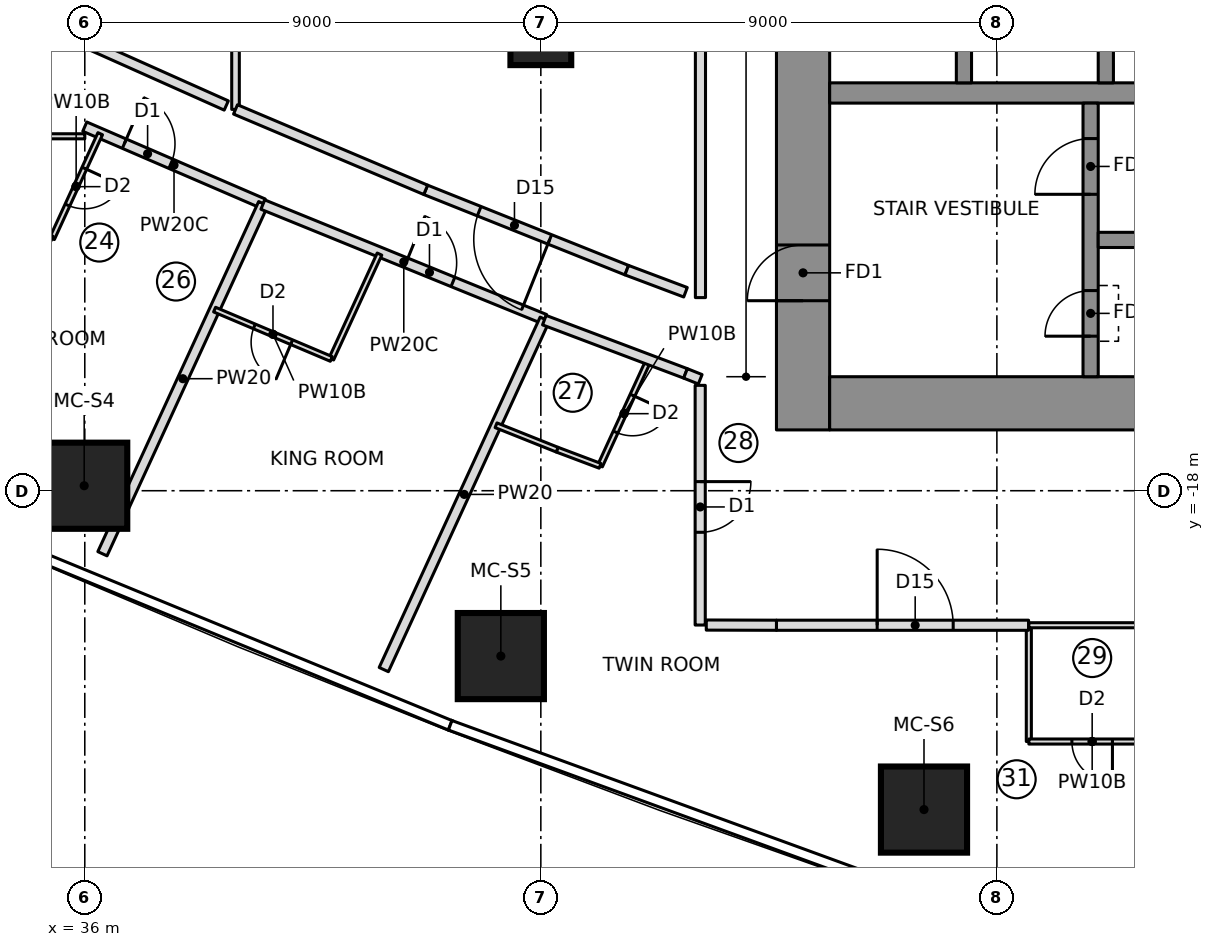
"""IFC4 building model, lengths in metres.
Left out: names, types, materials, properties, quantities, classifications, styles, units other than length and angle.
Written with IfcOpenShell. Run it as: python <this file> out.ifc"""

import sys

from ifc_helpers import new_model, si_unit, direction, frame, frame_2d, origin, origin_2d, place, context, subcontext, project, spatial, rectangle, extrude, element, fill, save


model = new_model("IFC4")
c1 = context("Model", 3, precision=1e-05, world=origin(), true_north=direction((0.0, 1.0)))
c2 = subcontext(c1, "Body", "Model", "MODEL_VIEW")
j1 = project(units=[si_unit("LENGTHUNIT", "METRE"), si_unit("PLANEANGLEUNIT", "RADIAN")], contexts=[c1])
p1 = place(None, origin())
s1 = spatial("IfcSite", under=j1, at=p1, CompositionType="ELEMENT")
p2 = place(p1, origin())
s2 = spatial("IfcBuilding", under=s1, at=p2, CompositionType="ELEMENT")
p3 = place(p2, frame((0.0, 0.0, 109.75)))
s3 = spatial("IfcBuildingStorey", under=s2, at=p3, CompositionType="ELEMENT", Elevation=109.75)
p4 = place(p3, frame((50.175, -16.8, 0.0), z_axis=(0.0, 0.0, 1.0), x_axis=(0.0, 1.0, 0.0)))
e1 = element("IfcWall", 1, at=p4, inside=s3, PredefinedType="SHEAR", context=c2, shape_type="SweptSolid", body=[
    extrude(rectangle(XDim=10.15, YDim=1.05, at=frame_2d((5.075, 0.0))), origin(), (0.0, 0.0, 1.0), 3.55),
])
p5 = place(p4, frame((2.55, 0.0, 0.0)))
e2 = element("IfcOpeningElement", 2, at=p5, cuts=e1, PredefinedType="OPENING", context=c2, shape_type="SweptSolid", body=[
    extrude(rectangle(XDim=1.1, YDim=2.1, at=frame_2d((0.55, 1.05))), frame((0.0, 0.535, 0.0), z_axis=(0.0, -1.0, 0.0), x_axis=(1.0, 0.0, 0.0)), (0.0, 0.0, 1.0), 1.07),
])
p6 = place(p3, frame((50.7, -16.275, 0.0), z_axis=(0.0, 0.0, 1.0), x_axis=(1.0, 0.0, 0.0)))
e3 = element("IfcWall", 3, at=p6, inside=s3, PredefinedType="SHEAR", context=c2, shape_type="SweptSolid", body=[
    extrude(rectangle(XDim=14.07, YDim=1.05, at=frame_2d((7.035, 0.0))), origin(), (0.0, 0.0, 1.0), 3.55),
])
p7 = place(p3, frame((50.7, -10.15, 0.0), z_axis=(0.0, 0.0, 1.0), x_axis=(1.0, 0.0, 0.0)))
e4 = element("IfcWall", 4, at=p7, inside=s3, PredefinedType="SHEAR", context=c2, shape_type="SweptSolid", body=[
    extrude(rectangle(XDim=13.02, YDim=0.4, at=frame_2d((6.51, 0.0))), origin(), (0.0, 0.0, 1.0), 3.55),
])
for number, where, z_axis, x_axis in (
    (5, (53.35, -9.95, 0.0), (0.0, 0.0, 1.0), (0.0, 1.0, 0.0)),
    (6, (56.15, -9.95, 0.0), (0.0, 0.0, 1.0), (0.0, 1.0, 0.0)),
):
    element("IfcWall", number, at=place(p3, frame(where, z_axis=z_axis, x_axis=x_axis)), inside=s3, PredefinedType="SHEAR", context=c2, shape_type="SweptSolid", body=[
        extrude(rectangle(XDim=3.0, YDim=0.3, at=frame_2d((1.5, 0.0))), origin(), (0.0, 0.0, 1.0), 3.55),
    ])
p8 = place(p3, frame((55.85, -15.75, 0.0), z_axis=(0.0, 0.0, 1.0), x_axis=(0.0, 1.0, 0.0)))
e7 = element("IfcWall", 7, at=p8, inside=s3, PredefinedType="SHEAR", context=c2, shape_type="SweptSolid", body=[
    extrude(rectangle(XDim=5.4, YDim=0.3, at=frame_2d((2.7, 0.0))), origin(), (0.0, 0.0, 1.0), 3.55),
])
p9 = place(p8, frame((3.6, 0.0, 0.0)))
e8 = element("IfcOpeningElement", 8, at=p9, cuts=e7, PredefinedType="OPENING", context=c2, shape_type="SweptSolid", body=[
    extrude(rectangle(XDim=1.1, YDim=2.1, at=frame_2d((0.55, 1.05))), frame((0.0, 0.16, 0.0), z_axis=(0.0, -1.0, 0.0), x_axis=(1.0, 0.0, 0.0)), (0.0, 0.0, 1.0), 0.32),
])
p10 = place(p8, frame((0.8, 0.0, 0.0)))
e9 = element("IfcOpeningElement", 9, at=p10, cuts=e7, PredefinedType="OPENING", context=c2, shape_type="SweptSolid", body=[
    extrude(rectangle(XDim=0.9, YDim=2.1, at=frame_2d((0.45, 1.05))), frame((0.0, 0.16, 0.0), z_axis=(0.0, -1.0, 0.0), x_axis=(1.0, 0.0, 0.0)), (0.0, 0.0, 1.0), 0.32),
])
p11 = place(p3, frame((56.0, -13.05, 0.0), z_axis=(0.0, 0.0, 1.0), x_axis=(1.0, 0.0, 0.0)))
e10 = element("IfcWall", 10, at=p11, inside=s3, PredefinedType="SHEAR", context=c2, shape_type="SweptSolid", body=[
    extrude(rectangle(XDim=7.72, YDim=0.3, at=frame_2d((3.86, 0.0))), origin(), (0.0, 0.0, 1.0), 3.55),
])
for number, where, z_axis, x_axis in (
    (11, (35.988, -17.902, 0.0), (0.0, 0.0, 1.0), (1.0, 0.0, 0.0)),
    (12, (44.211, -21.264, 0.0), (0.0, 0.0, 1.0), (1.0, 0.0, 0.0)),
    (13, (52.562, -24.293, 0.0), (0.0, 0.0, 1.0), (1.0, 0.0, 0.0)),
):
    element("IfcColumn", number, at=place(p3, frame(where, z_axis=z_axis, x_axis=x_axis)), inside=s3, PredefinedType="COLUMN", context=c2, shape_type="SweptSolid", body=[
        extrude(rectangle(XDim=1.7, YDim=1.7, at=origin_2d()), origin(), (0.0, 0.0, 1.0), 3.55),
    ])
p12 = place(p3, frame((45.0, -9.0, 0.0), z_axis=(0.0, 0.0, 1.0), x_axis=(1.0, 0.0, 0.0)))
e14 = element("IfcColumn", 14, at=p12, inside=s3, PredefinedType="COLUMN", context=c2, shape_type="SweptSolid", body=[
    extrude(rectangle(XDim=1.2, YDim=1.2, at=origin_2d()), origin(), (0.0, 0.0, 1.0), 3.55),
])
p13 = place(p3, frame((54.631, -22.95, 0.0), z_axis=(0.0, 0.0, 1.0), x_axis=(0.0, 1.0, 0.0)))
e15 = element("IfcWall", 15, at=p13, inside=s3, PredefinedType="PARTITIONING", context=c2, shape_type="SweptSolid", body=[
    extrude(rectangle(XDim=2.3, YDim=0.1, at=frame_2d((1.15, 0.0))), origin(), (0.0, 0.0, 1.0), 3.25),
])
p14 = place(p3, frame((57.131, -22.95, 0.0), z_axis=(0.0, 0.0, 1.0), x_axis=(-1.0, 0.0, 0.0)))
e16 = element("IfcWall", 16, at=p14, inside=s3, PredefinedType="PARTITIONING", context=c2, shape_type="SweptSolid", body=[
    extrude(rectangle(XDim=2.5, YDim=0.1, at=frame_2d((1.25, 0.0))), origin(), (0.0, 0.0, 1.0), 3.25),
])
p15 = place(p14, frame((0.85, 0.0, 0.0)))
e17 = element("IfcOpeningElement", 17, at=p15, cuts=e16, PredefinedType="OPENING", context=c2, shape_type="SweptSolid", body=[
    extrude(rectangle(XDim=0.8, YDim=2.1, at=frame_2d((0.4, 1.05))), frame((0.0, 0.06, 0.0), z_axis=(0.0, -1.0, 0.0), x_axis=(1.0, 0.0, 0.0)), (0.0, 0.0, 1.0), 0.12),
])
p16 = place(p3, frame((36.0, -10.815, 0.0), z_axis=(0.0, 0.0, 1.0), x_axis=(0.918174446699, -0.396176331233, 0.0)))
e18 = element("IfcWall", 18, at=p16, inside=s3, PredefinedType="PARTITIONING", context=c2, shape_type="SweptSolid", body=[
    extrude(rectangle(XDim=3.836, YDim=0.2, at=frame_2d((1.918, 0.0))), origin(), (0.0, 0.0, 1.0), 3.25),
])
p17 = place(p16, frame((0.85, 0.0, 0.0)))
e19 = element("IfcOpeningElement", 19, at=p17, cuts=e18, PredefinedType="OPENING", context=c2, shape_type="SweptSolid", body=[
    extrude(rectangle(XDim=1.0, YDim=2.1, at=frame_2d((0.5, 1.05))), frame((0.0, 0.11, 0.0), z_axis=(0.0, -1.0, 0.0), x_axis=(1.0, 0.0, 0.0)), (0.0, 0.0, 1.0), 0.22),
])
p18 = place(p3, frame((36.305, -10.954, 0.0), z_axis=(0.0, 0.0, 1.0), x_axis=(-0.41750734959, -0.908673545911, 0.0)))
e20 = element("IfcWall", 20, at=p18, inside=s3, PredefinedType="PARTITIONING", context=c2, shape_type="SweptSolid", body=[
    extrude(rectangle(XDim=2.277, YDim=0.1, at=frame_2d((1.139, 0.0))), origin(), (0.0, 0.0, 1.0), 3.25),
])
p19 = place(p18, frame((0.75, 0.0, 0.0)))
e21 = element("IfcOpeningElement", 21, at=p19, cuts=e20, PredefinedType="OPENING", context=c2, shape_type="SweptSolid", body=[
    extrude(rectangle(XDim=0.8, YDim=2.1, at=frame_2d((0.4, 1.05))), frame((0.0, 0.06, 0.0), z_axis=(0.0, -1.0, 0.0), x_axis=(1.0, 0.0, 0.0)), (0.0, 0.0, 1.0), 0.12),
])
p20 = place(p3, frame((35.354, -13.023, 0.0), z_axis=(0.0, 0.0, 1.0), x_axis=(-0.913060453705, 0.407824236504, 0.0)))
e22 = element("IfcWall", 22, at=p20, inside=s3, PredefinedType="PARTITIONING", context=c2, shape_type="SweptSolid", body=[
    extrude(rectangle(XDim=2.243, YDim=0.1, at=frame_2d((1.122, 0.0))), origin(), (0.0, 0.0, 1.0), 3.25),
])
p21 = place(p3, frame((36.348, -19.244, 0.0), z_axis=(0.0, 0.0, 1.0), x_axis=(0.417442847913, 0.908703179661, 0.0)))
e23 = element("IfcWall", 23, at=p21, inside=s3, PredefinedType="PARTITIONING", context=c2, shape_type="SweptSolid", body=[
    extrude(rectangle(XDim=7.604, YDim=0.2, at=frame_2d((3.802, 0.0))), origin(), (0.0, 0.0, 1.0), 3.25),
])
p22 = place(p3, frame((39.514, -12.353, 0.0), z_axis=(0.0, 0.0, 1.0), x_axis=(0.926327862679, -0.376718317613, 0.0)))
e24 = element("IfcWall", 24, at=p22, inside=s3, PredefinedType="PARTITIONING", context=c2, shape_type="SweptSolid", body=[
    extrude(rectangle(XDim=6.006, YDim=0.2, at=frame_2d((3.003, 0.0))), origin(), (0.0, 0.0, 1.0), 3.25),
])
p23 = place(p22, frame((3.05, 0.0, 0.0)))
e25 = element("IfcOpeningElement", 25, at=p23, cuts=e24, PredefinedType="OPENING", context=c2, shape_type="SweptSolid", body=[
    extrude(rectangle(XDim=1.0, YDim=2.1, at=frame_2d((0.5, 1.05))), frame((0.0, 0.11, 0.0), z_axis=(0.0, -1.0, 0.0), x_axis=(1.0, 0.0, 0.0)), (0.0, 0.0, 1.0), 0.22),
])
p24 = place(p3, frame((41.816, -13.33, 0.0), z_axis=(0.0, 0.0, 1.0), x_axis=(-0.417433204355, -0.908707609686, 0.0)))
e26 = element("IfcWall", 26, at=p24, inside=s3, PredefinedType="PARTITIONING", context=c2, shape_type="SweptSolid", body=[
    extrude(rectangle(XDim=2.278, YDim=0.1, at=frame_2d((1.139, 0.0))), origin(), (0.0, 0.0, 1.0), 3.25),
])
p25 = place(p3, frame((40.865, -15.4, 0.0), z_axis=(0.0, 0.0, 1.0), x_axis=(-0.921042675983, 0.38946166566, 0.0)))
e27 = element("IfcWall", 27, at=p25, inside=s3, PredefinedType="PARTITIONING", context=c2, shape_type="SweptSolid", body=[
    extrude(rectangle(XDim=2.501, YDim=0.1, at=frame_2d((1.25, 0.0))), origin(), (0.0, 0.0, 1.0), 3.25),
])
p26 = place(p25, frame((0.85, 0.0, 0.0)))
e28 = element("IfcOpeningElement", 28, at=p26, cuts=e27, PredefinedType="OPENING", context=c2, shape_type="SweptSolid", body=[
    extrude(rectangle(XDim=0.8, YDim=2.1, at=frame_2d((0.4, 1.05))), frame((0.0, 0.06, 0.0), z_axis=(0.0, -1.0, 0.0), x_axis=(1.0, 0.0, 0.0)), (0.0, 0.0, 1.0), 0.12),
])
p27 = place(p3, frame((41.901, -21.53, 0.0), z_axis=(0.0, 0.0, 1.0), x_axis=(0.417427858403, 0.908710065438, 0.0)))
e29 = element("IfcWall", 29, at=p27, inside=s3, PredefinedType="PARTITIONING", context=c2, shape_type="SweptSolid", body=[
    extrude(rectangle(XDim=7.61, YDim=0.2, at=frame_2d((3.805, 0.0))), origin(), (0.0, 0.0, 1.0), 3.25),
])
p28 = place(p3, frame((47.122, -15.434, 0.0), z_axis=(0.0, 0.0, 1.0), x_axis=(-0.417409478396, -0.90871850831, 0.0)))
e30 = element("IfcWall", 30, at=p28, inside=s3, PredefinedType="PARTITIONING", context=c2, shape_type="SweptSolid", body=[
    extrude(rectangle(XDim=2.283, YDim=0.1, at=frame_2d((1.142, 0.0))), origin(), (0.0, 0.0, 1.0), 3.25),
])
p29 = place(p28, frame((0.75, 0.0, 0.0)))
e31 = element("IfcOpeningElement", 31, at=p29, cuts=e30, PredefinedType="OPENING", context=c2, shape_type="SweptSolid", body=[
    extrude(rectangle(XDim=0.8, YDim=2.1, at=frame_2d((0.4, 1.05))), frame((0.0, 0.06, 0.0), z_axis=(0.0, -1.0, 0.0), x_axis=(1.0, 0.0, 0.0)), (0.0, 0.0, 1.0), 0.12),
])
p30 = place(p3, frame((46.169, -17.509, 0.0), z_axis=(0.0, 0.0, 1.0), x_axis=(-0.935885332459, 0.352304760808, 0.0)))
e32 = element("IfcWall", 32, at=p30, inside=s3, PredefinedType="PARTITIONING", context=c2, shape_type="SweptSolid", body=[
    extrude(rectangle(XDim=0.906, YDim=0.1, at=frame_2d((0.453, 0.0))), origin(), (0.0, 0.0, 1.0), 3.25),
])
p31 = place(p3, frame((45.321, -17.19, 0.0), z_axis=(0.0, 0.0, 1.0), x_axis=(-0.928593389657, 0.371098796393, 0.0)))
e33 = element("IfcWall", 33, at=p31, inside=s3, PredefinedType="PARTITIONING", context=c2, shape_type="SweptSolid", body=[
    extrude(rectangle(XDim=1.298, YDim=0.1, at=frame_2d((0.649, 0.0))), origin(), (0.0, 0.0, 1.0), 3.25),
])
p32 = place(p3, frame((38.792, -10.397, 0.0), z_axis=(0.0, 0.0, 1.0), x_axis=(-0.913029587861, 0.407893333716, 0.0)))
e34 = element("IfcWall", 34, at=p32, inside=s3, PredefinedType="PARTITIONING", context=c2, shape_type="SweptSolid", body=[
    extrude(rectangle(XDim=3.058, YDim=0.2, at=frame_2d((1.529, 0.0))), origin(), (0.0, 0.0, 1.0), 3.25),
])
p33 = place(p3, frame((38.975, -10.474, 0.0), z_axis=(0.0, 0.0, 1.0), x_axis=(0.0, 1.0, 0.0)))
e35 = element("IfcWall", 35, at=p33, inside=s3, PredefinedType="PARTITIONING", context=c2, shape_type="SweptSolid", body=[
    extrude(rectangle(XDim=20.949, YDim=0.15, at=frame_2d((10.474, 0.0))), origin(), (0.0, 0.0, 1.0), 3.25),
])
p34 = place(p3, frame((46.696, -13.647, 0.0), z_axis=(0.0, 0.0, 1.0), x_axis=(-0.928638161177, 0.370986745864, 0.0)))
e36 = element("IfcWall", 36, at=p34, inside=s3, PredefinedType="PARTITIONING", context=c2, shape_type="SweptSolid", body=[
    extrude(rectangle(XDim=4.273, YDim=0.2, at=frame_2d((2.136, 0.0))), origin(), (0.0, 0.0, 1.0), 3.25),
])
p35 = place(p34, frame((1.636, 0.0, 0.0)))
e37 = element("IfcOpeningElement", 37, at=p35, cuts=e36, PredefinedType="OPENING", context=c2, shape_type="SweptSolid", body=[
    extrude(rectangle(XDim=1.5, YDim=2.1, at=frame_2d((0.75, 1.05))), frame((0.0, 0.11, 0.0), z_axis=(0.0, -1.0, 0.0), x_axis=(1.0, 0.0, 0.0)), (0.0, 0.0, 1.0), 0.22),
])
p36 = place(p3, frame((42.728, -12.062, 0.0), z_axis=(0.0, 0.0, 1.0), x_axis=(-0.921030909625, 0.389489490891, 0.0)))
e38 = element("IfcWall", 38, at=p36, inside=s3, PredefinedType="PARTITIONING", context=c2, shape_type="SweptSolid", body=[
    extrude(rectangle(XDim=4.075, YDim=0.2, at=frame_2d((2.038, 0.0))), origin(), (0.0, 0.0, 1.0), 3.25),
])
p37 = place(p3, frame((49.65, -20.655, 0.0), z_axis=(0.0, 0.0, 1.0), x_axis=(1.0, 0.0, 0.0)))
e39 = element("IfcWall", 39, at=p37, inside=s3, PredefinedType="PARTITIONING", context=c2, shape_type="SweptSolid", body=[
    extrude(rectangle(XDim=4.976, YDim=0.2, at=frame_2d((2.488, 0.0))), origin(), (0.0, 0.0, 1.0), 3.25),
])
p38 = place(p37, frame((1.988, 0.0, 0.0)))
e40 = element("IfcOpeningElement", 40, at=p38, cuts=e39, PredefinedType="OPENING", context=c2, shape_type="SweptSolid", body=[
    extrude(rectangle(XDim=1.5, YDim=2.1, at=frame_2d((0.75, 1.05))), frame((0.0, 0.11, 0.0), z_axis=(0.0, -1.0, 0.0), x_axis=(1.0, 0.0, 0.0)), (0.0, 0.0, 1.0), 0.22),
])
p39 = place(p3, frame((54.631, -20.655, 0.0), z_axis=(0.0, 0.0, 1.0), x_axis=(1.0, 0.0, 0.0)))
e41 = element("IfcWall", 41, at=p39, inside=s3, PredefinedType="PARTITIONING", context=c2, shape_type="SweptSolid", body=[
    extrude(rectangle(XDim=2.5, YDim=0.1, at=frame_2d((1.25, 0.0))), origin(), (0.0, 0.0, 1.0), 3.25),
])
p40 = place(p3, frame((33.53, -11.005, 0.0), z_axis=(0.0, 0.0, 1.0), x_axis=(1.0, 0.0, 0.0)))
e42 = element("IfcWall", 42, at=p40, inside=s3, PredefinedType="PARTITIONING", context=c2, shape_type="SweptSolid", body=[
    extrude(rectangle(XDim=2.47, YDim=0.1, at=frame_2d((1.235, 0.0))), origin(), (0.0, 0.0, 1.0), 3.25),
])
p41 = place(p3, frame((45.069, -14.634, 0.0), z_axis=(0.0, 0.0, 1.0), x_axis=(0.93564003724, -0.352955692282, 0.0)))
e43 = element("IfcWall", 43, at=p41, inside=s3, PredefinedType="PARTITIONING", context=c2, shape_type="SweptSolid", body=[
    extrude(rectangle(XDim=2.978, YDim=0.2, at=frame_2d((1.489, 0.0))), origin(), (0.0, 0.0, 1.0), 3.25),
])
p42 = place(p3, frame((47.855, -14.083, 0.0), z_axis=(0.0, 0.0, 1.0), x_axis=(-0.935907269358, 0.352246480696, 0.0)))
e44 = element("IfcWall", 44, at=p42, inside=s3, PredefinedType="PARTITIONING", context=c2, shape_type="SweptSolid", body=[
    extrude(rectangle(XDim=1.239, YDim=0.2, at=frame_2d((0.619, 0.0))), origin(), (0.0, 0.0, 1.0), 3.25),
])
p43 = place(p3, frame((48.15, 14.189, 0.0), z_axis=(0.0, 0.0, 1.0), x_axis=(0.0, -1.0, 0.0)))
e45 = element("IfcWall", 45, at=p43, inside=s3, PredefinedType="PARTITIONING", context=c2, shape_type="SweptSolid", body=[
    extrude(rectangle(XDim=28.377, YDim=0.2, at=frame_2d((14.189, 0.0))), origin(), (0.0, 0.0, 1.0), 3.25),
])
p44 = place(p3, frame((47.855, -15.685, 0.0), z_axis=(0.0, 0.0, 1.0), x_axis=(0.928638194287, -0.370986662983, 0.0)))
e46 = element("IfcWall", 46, at=p44, inside=s3, PredefinedType="PARTITIONING", context=c2, shape_type="SweptSolid", body=[
    extrude(rectangle(XDim=0.312, YDim=0.2, at=frame_2d((0.156, 0.0))), origin(), (0.0, 0.0, 1.0), 3.25),
])
p45 = place(p3, frame((48.145, -15.92, 0.0), z_axis=(0.0, 0.0, 1.0), x_axis=(-5.1610239e-05, -0.999999998668, 0.0)))
e47 = element("IfcWall", 47, at=p45, inside=s3, PredefinedType="PARTITIONING", context=c2, shape_type="SweptSolid", body=[
    extrude(rectangle(XDim=4.73, YDim=0.2, at=frame_2d((2.365, 0.0))), origin(), (0.0, 0.0, 1.0), 3.25),
])
p46 = place(p45, frame((1.9, 0.0, 0.0)))
e48 = element("IfcOpeningElement", 48, at=p46, cuts=e47, PredefinedType="OPENING", context=c2, shape_type="SweptSolid", body=[
    extrude(rectangle(XDim=1.0, YDim=2.1, at=frame_2d((0.5, 1.05))), frame((0.0, 0.11, 0.0), z_axis=(0.0, -1.0, 0.0), x_axis=(1.0, 0.0, 0.0)), (0.0, 0.0, 1.0), 0.22),
])
p47 = place(p3, frame((48.265, -20.651, 0.0), z_axis=(0.0, 0.0, 1.0), x_axis=(0.999996503144, -0.002644560569, 0.0)))
e49 = element("IfcWall", 49, at=p47, inside=s3, PredefinedType="PARTITIONING", context=c2, shape_type="SweptSolid", body=[
    extrude(rectangle(XDim=1.385, YDim=0.2, at=frame_2d((0.692, 0.0))), origin(), (0.0, 0.0, 1.0), 3.25),
])
p48 = place(p15, origin())
e50 = element("IfcDoor", 50, at=p48, inside=s3, OperationType="SINGLE_SWING_LEFT", PredefinedType="DOOR", context=c2, shape_type="SweptSolid", body=[
    extrude(rectangle(XDim=0.8, YDim=2.1, at=frame_2d((0.4, 1.05))), frame((0.0, 0.025, 0.0), z_axis=(0.0, -1.0, 0.0), x_axis=(1.0, 0.0, 0.0)), (0.0, 0.0, 1.0), 0.05),
])
fill(e17, e50)
p49 = place(p19, origin())
e51 = element("IfcDoor", 51, at=p49, inside=s3, OperationType="SINGLE_SWING_LEFT", PredefinedType="DOOR", context=c2, shape_type="SweptSolid", body=[
    extrude(rectangle(XDim=0.8, YDim=2.1, at=frame_2d((0.4, 1.05))), frame((0.0, 0.025, 0.0), z_axis=(0.0, -1.0, 0.0), x_axis=(1.0, 0.0, 0.0)), (0.0, 0.0, 1.0), 0.05),
])
fill(e21, e51)
p50 = place(p17, origin())
e52 = element("IfcDoor", 52, at=p50, inside=s3, OperationType="SINGLE_SWING_LEFT", PredefinedType="DOOR", context=c2, shape_type="SweptSolid", body=[
    extrude(rectangle(XDim=1.0, YDim=2.1, at=frame_2d((0.5, 1.05))), frame((0.0, 0.025, 0.0), z_axis=(0.0, -1.0, 0.0), x_axis=(1.0, 0.0, 0.0)), (0.0, 0.0, 1.0), 0.05),
])
fill(e19, e52)
p51 = place(p26, origin())
e53 = element("IfcDoor", 53, at=p51, inside=s3, OperationType="SINGLE_SWING_LEFT", PredefinedType="DOOR", context=c2, shape_type="SweptSolid", body=[
    extrude(rectangle(XDim=0.8, YDim=2.1, at=frame_2d((0.4, 1.05))), frame((0.0, 0.025, 0.0), z_axis=(0.0, -1.0, 0.0), x_axis=(1.0, 0.0, 0.0)), (0.0, 0.0, 1.0), 0.05),
])
fill(e28, e53)
p52 = place(p23, origin())
e54 = element("IfcDoor", 54, at=p52, inside=s3, OperationType="SINGLE_SWING_LEFT", PredefinedType="DOOR", context=c2, shape_type="SweptSolid", body=[
    extrude(rectangle(XDim=1.0, YDim=2.1, at=frame_2d((0.5, 1.05))), frame((0.0, 0.025, 0.0), z_axis=(0.0, -1.0, 0.0), x_axis=(1.0, 0.0, 0.0)), (0.0, 0.0, 1.0), 0.05),
])
fill(e25, e54)
p53 = place(p29, origin())
e55 = element("IfcDoor", 55, at=p53, inside=s3, OperationType="SINGLE_SWING_LEFT", PredefinedType="DOOR", context=c2, shape_type="SweptSolid", body=[
    extrude(rectangle(XDim=0.8, YDim=2.1, at=frame_2d((0.4, 1.05))), frame((0.0, 0.025, 0.0), z_axis=(0.0, -1.0, 0.0), x_axis=(1.0, 0.0, 0.0)), (0.0, 0.0, 1.0), 0.05),
])
fill(e31, e55)
p54 = place(p35, origin())
e56 = element("IfcDoor", 56, at=p54, inside=s3, OperationType="DOUBLE_DOOR_SINGLE_SWING", PredefinedType="DOOR", context=c2, shape_type="SweptSolid", body=[
    extrude(rectangle(XDim=1.5, YDim=2.1, at=frame_2d((0.75, 1.05))), frame((0.0, 0.025, 0.0), z_axis=(0.0, -1.0, 0.0), x_axis=(1.0, 0.0, 0.0)), (0.0, 0.0, 1.0), 0.05),
])
fill(e37, e56)
p55 = place(p38, origin())
e57 = element("IfcDoor", 57, at=p55, inside=s3, OperationType="DOUBLE_DOOR_SINGLE_SWING", PredefinedType="DOOR", context=c2, shape_type="SweptSolid", body=[
    extrude(rectangle(XDim=1.5, YDim=2.1, at=frame_2d((0.75, 1.05))), frame((0.0, 0.025, 0.0), z_axis=(0.0, -1.0, 0.0), x_axis=(1.0, 0.0, 0.0)), (0.0, 0.0, 1.0), 0.05),
])
fill(e40, e57)
p56 = place(p46, origin())
e58 = element("IfcDoor", 58, at=p56, inside=s3, OperationType="SINGLE_SWING_LEFT", PredefinedType="DOOR", context=c2, shape_type="SweptSolid", body=[
    extrude(rectangle(XDim=1.0, YDim=2.1, at=frame_2d((0.5, 1.05))), frame((0.0, 0.025, 0.0), z_axis=(0.0, -1.0, 0.0), x_axis=(1.0, 0.0, 0.0)), (0.0, 0.0, 1.0), 0.05),
])
fill(e48, e58)
p57 = place(p9, origin())
e59 = element("IfcDoor", 59, at=p57, inside=s3, OperationType="SINGLE_SWING_RIGHT", PredefinedType="DOOR", context=c2, shape_type="SweptSolid", body=[
    extrude(rectangle(XDim=1.1, YDim=2.1, at=frame_2d((0.55, 1.05))), frame((0.0, 0.025, 0.0), z_axis=(0.0, -1.0, 0.0), x_axis=(1.0, 0.0, 0.0)), (0.0, 0.0, 1.0), 0.05),
])
fill(e8, e59)
p58 = place(p5, origin())
e60 = element("IfcDoor", 60, at=p58, inside=s3, OperationType="SINGLE_SWING_RIGHT", PredefinedType="DOOR", context=c2, shape_type="SweptSolid", body=[
    extrude(rectangle(XDim=1.1, YDim=2.1, at=frame_2d((0.55, 1.05))), frame((0.0, 0.025, 0.0), z_axis=(0.0, -1.0, 0.0), x_axis=(1.0, 0.0, 0.0)), (0.0, 0.0, 1.0), 0.05),
])
fill(e2, e60)
p59 = place(p10, origin())
e61 = element("IfcDoor", 61, at=p59, inside=s3, OperationType="SINGLE_SWING_LEFT", PredefinedType="DOOR", context=c2, shape_type="SweptSolid", body=[
    extrude(rectangle(XDim=0.9, YDim=2.1, at=frame_2d((0.45, 1.05))), frame((0.0, 0.025, 0.0), z_axis=(0.0, -1.0, 0.0), x_axis=(1.0, 0.0, 0.0)), (0.0, 0.0, 1.0), 0.05),
])
fill(e9, e61)
save(model, sys.argv[1])
